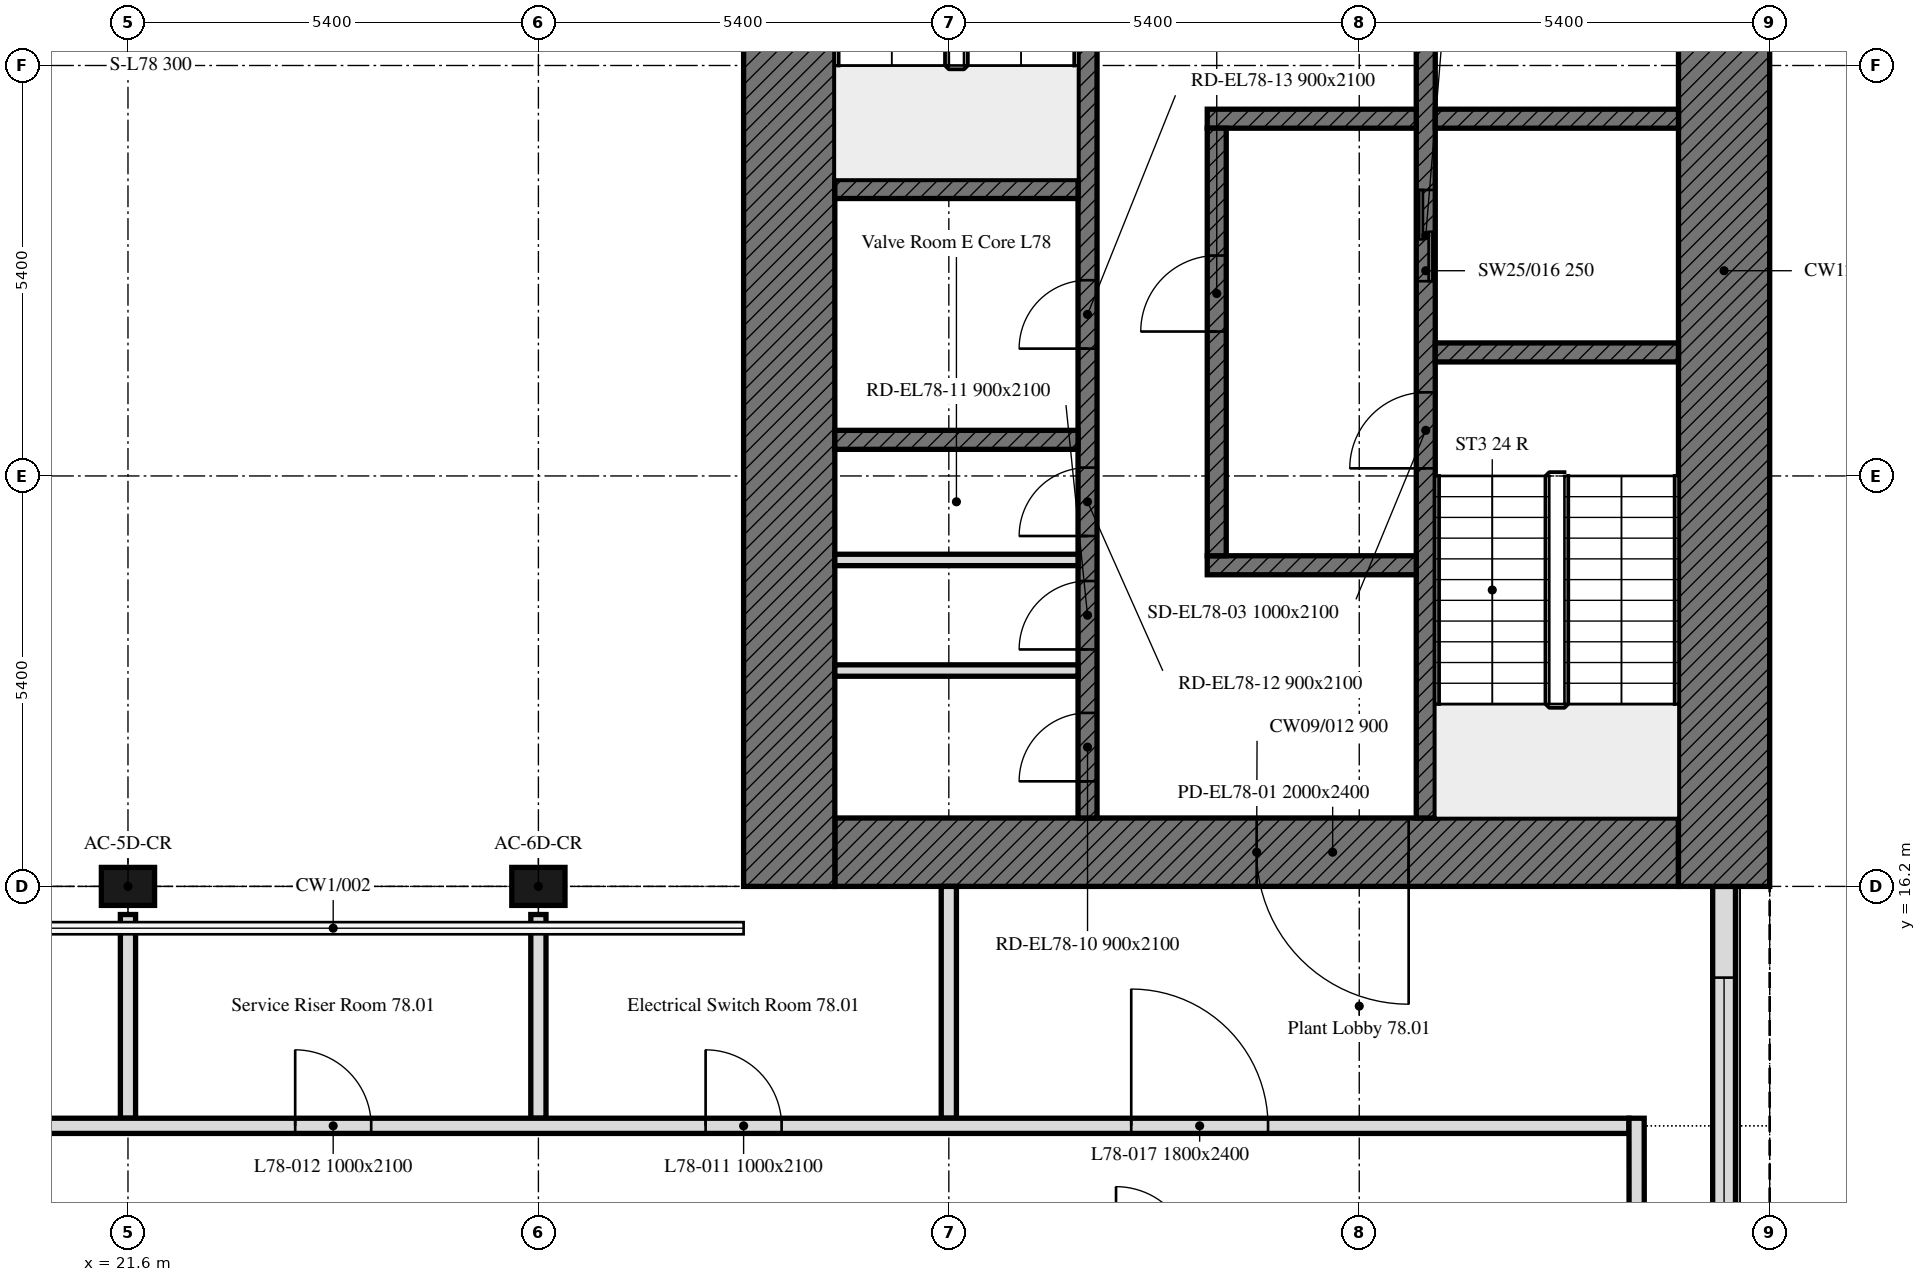
"""IFC4 building model, lengths in metres.
Left out: names, types, materials, properties, quantities, classifications, styles, units other than length and angle.
Written with IfcOpenShell. Run it as: python <this file> out.ifc"""

import sys

from ifc_helpers import new_model, si_unit, direction, frame, frame_2d, origin, origin_2d, place, context, subcontext, project, spatial, polyline, rectangle, outline, extrude, element, fill, save


model = new_model("IFC4")
c1 = context("Model", 3, precision=1e-05, world=origin(), true_north=direction((0.0, 1.0)))
c2 = subcontext(c1, "Body", "Model", "MODEL_VIEW")
j1 = project(units=[si_unit("LENGTHUNIT", "METRE"), si_unit("PLANEANGLEUNIT", "RADIAN")], contexts=[c1])
p1 = place(None, origin())
s1 = spatial("IfcSite", under=j1, at=p1, CompositionType="ELEMENT")
p2 = place(p1, origin())
s2 = spatial("IfcBuilding", under=s1, at=p2, CompositionType="ELEMENT")
p3 = place(p2, frame((0.0, 0.0, 312.7)))
s3 = spatial("IfcBuildingStorey", under=s2, at=p3, CompositionType="ELEMENT", Elevation=312.7)
for number, where, z_axis, x_axis in (
    (1, (21.6, 16.2, 0.0), (0.0, 0.0, 1.0), (1.0, 0.0, 0.0)),
    (2, (27.0, 16.2, 0.0), (0.0, 0.0, 1.0), (1.0, 0.0, 0.0)),
):
    element("IfcColumn", number, at=place(p3, frame(where, z_axis=z_axis, x_axis=x_axis)), inside=s3, PredefinedType="COLUMN", context=c2, shape_type="SweptSolid", body=[
        extrude(rectangle(XDim=0.7, YDim=0.5, at=origin_2d()), origin(), (0.0, 0.0, 1.0), 4.2),
    ])
p4 = place(p3, frame((42.6, 10.986, 0.0), z_axis=(0.0, 0.0, 1.0), x_axis=(0.0, 1.0, 0.0)))
e3 = element("IfcWall", 3, at=p4, inside=s3, PredefinedType="SOLIDWALL", context=c2, shape_type="SweptSolid", body=[
    extrude(outline(polyline([(0.0, 0.0), (5.214, 0.0), (5.214, 4.2), (4.634, 4.2), (4.055, 4.2), (3.476, 4.2), (2.896, 4.2), (2.317, 4.2), (1.738, 4.2), (1.159, 4.2), (0.579, 4.2), (0.0, 4.2), (0.0, 0.0)])), frame((0.0, 0.15, 0.0), z_axis=(0.0, -1.0, 0.0), x_axis=(1.0, 0.0, 0.0)), (0.0, 0.0, 1.0), 0.3),
])
p5 = place(p4, frame((1.014, 0.0, 0.6)))
e4 = element("IfcOpeningElement", 4, at=p5, cuts=e3, PredefinedType="OPENING", context=c2, shape_type="SweptSolid", body=[
    extrude(rectangle(XDim=3.0, YDim=1.8, at=frame_2d((1.5, 0.9))), frame((0.0, 0.16, 0.0), z_axis=(0.0, -1.0, 0.0), x_axis=(1.0, 0.0, 0.0)), (0.0, 0.0, 1.0), 0.32),
])
p6 = place(p3, frame((42.0, 16.65, 0.0), z_axis=(0.0, 0.0, 1.0), x_axis=(-1.0, 0.0, 0.0)))
e5 = element("IfcWall", 5, at=p6, inside=s3, PredefinedType="SOLIDWALL", context=c2, shape_type="SweptSolid", body=[
    extrude(rectangle(XDim=11.1, YDim=0.9, at=frame_2d((5.55, 0.0))), origin(), (0.0, 0.0, 1.0), 4.2),
])
p7 = place(p6, frame((3.55, 0.0, 0.0)))
e6 = element("IfcOpeningElement", 6, at=p7, cuts=e5, PredefinedType="OPENING", context=c2, shape_type="SweptSolid", body=[
    extrude(rectangle(XDim=2.0, YDim=2.4, at=frame_2d((1.0, 1.2))), frame((0.0, 0.45, 0.0), z_axis=(0.0, -1.0, 0.0), x_axis=(1.0, 0.0, 0.0)), (0.0, 0.0, 1.0), 0.9),
])
for number, where, z_axis, x_axis in (
    (7, (42.6, 32.4, 0.0), (0.0, 0.0, 1.0), (0.0, -1.0, 0.0)),
    (8, (30.3, 16.2, 0.0), (0.0, 0.0, 1.0), (0.0, 1.0, 0.0)),
):
    element("IfcWall", number, at=place(p3, frame(where, z_axis=z_axis, x_axis=x_axis)), inside=s3, PredefinedType="SOLIDWALL", context=c2, shape_type="SweptSolid", body=[
        extrude(rectangle(XDim=16.2, YDim=1.2, at=frame_2d((8.1, 0.0))), origin(), (0.0, 0.0, 1.0), 4.2),
    ])
p8 = place(p3, frame((38.675, 17.1, 0.0), z_axis=(0.0, 0.0, 1.0), x_axis=(0.0, 1.0, 0.0)))
e9 = element("IfcWall", 9, at=p8, inside=s3, PredefinedType="SOLIDWALL", context=c2, shape_type="SweptSolid", body=[
    extrude(rectangle(XDim=14.4, YDim=0.25, at=frame_2d((7.2, 0.0))), origin(), (0.0, 0.0, 1.0), 4.2),
])
p9 = place(p8, frame((4.6, 0.0, 0.0)))
e10 = element("IfcOpeningElement", 10, at=p9, cuts=e9, PredefinedType="OPENING", context=c2, shape_type="SweptSolid", body=[
    extrude(rectangle(XDim=1.0, YDim=2.1, at=frame_2d((0.5, 1.05))), frame((0.0, 0.125, 0.0), z_axis=(0.0, -1.0, 0.0), x_axis=(1.0, 0.0, 0.0)), (0.0, 0.0, 1.0), 0.25),
])
p10 = place(p8, frame((7.062, 0.0, 0.0)))
e11 = element("IfcOpeningElement", 11, at=p10, cuts=e9, PredefinedType="OPENING", context=c2, shape_type="SweptSolid", body=[
    extrude(rectangle(XDim=1.2, YDim=2.1, at=frame_2d((0.6, 1.05))), frame((0.0, 0.125, 0.0), z_axis=(0.0, -1.0, 0.0), x_axis=(1.0, 0.0, 0.0)), (0.0, 0.0, 1.0), 0.25),
])
p11 = place(p8, frame((10.41, 0.0, 0.0)))
e12 = element("IfcOpeningElement", 12, at=p11, cuts=e9, PredefinedType="OPENING", context=c2, shape_type="SweptSolid", body=[
    extrude(rectangle(XDim=0.9, YDim=2.1, at=frame_2d((0.45, 1.05))), frame((0.0, 0.125, 0.0), z_axis=(0.0, -1.0, 0.0), x_axis=(1.0, 0.0, 0.0)), (0.0, 0.0, 1.0), 0.25),
])
p12 = place(p8, frame((13.023, 0.0, 0.0)))
e13 = element("IfcOpeningElement", 13, at=p12, cuts=e9, PredefinedType="OPENING", context=c2, shape_type="SweptSolid", body=[
    extrude(rectangle(XDim=0.9, YDim=2.1, at=frame_2d((0.45, 1.05))), frame((0.0, 0.125, 0.0), z_axis=(0.0, -1.0, 0.0), x_axis=(1.0, 0.0, 0.0)), (0.0, 0.0, 1.0), 0.25),
])
p13 = place(p3, frame((34.225, 17.1, 0.0), z_axis=(0.0, 0.0, 1.0), x_axis=(0.0, 1.0, 0.0)))
e14 = element("IfcWall", 14, at=p13, inside=s3, PredefinedType="SOLIDWALL", context=c2, shape_type="SweptSolid", body=[
    extrude(rectangle(XDim=14.4, YDim=0.25, at=frame_2d((7.2, 0.0))), origin(), (0.0, 0.0, 1.0), 4.2),
])
p14 = place(p13, frame((13.15, 0.0, 0.0)))
e15 = element("IfcOpeningElement", 15, at=p14, cuts=e14, PredefinedType="OPENING", context=c2, shape_type="SweptSolid", body=[
    extrude(rectangle(XDim=1.0, YDim=2.1, at=frame_2d((0.5, 1.05))), frame((0.0, 0.125, 0.0), z_axis=(0.0, -1.0, 0.0), x_axis=(1.0, 0.0, 0.0)), (0.0, 0.0, 1.0), 0.25),
])
p15 = place(p13, frame((0.482, 0.0, 0.0)))
e16 = element("IfcOpeningElement", 16, at=p15, cuts=e14, PredefinedType="OPENING", context=c2, shape_type="SweptSolid", body=[
    extrude(rectangle(XDim=0.9, YDim=2.1, at=frame_2d((0.45, 1.05))), frame((0.0, 0.125, 0.0), z_axis=(0.0, -1.0, 0.0), x_axis=(1.0, 0.0, 0.0)), (0.0, 0.0, 1.0), 0.25),
])
p16 = place(p13, frame((2.218, 0.0, 0.0)))
e17 = element("IfcOpeningElement", 17, at=p16, cuts=e14, PredefinedType="OPENING", context=c2, shape_type="SweptSolid", body=[
    extrude(rectangle(XDim=0.9, YDim=2.1, at=frame_2d((0.45, 1.05))), frame((0.0, 0.125, 0.0), z_axis=(0.0, -1.0, 0.0), x_axis=(1.0, 0.0, 0.0)), (0.0, 0.0, 1.0), 0.25),
])
p17 = place(p13, frame((3.71, 0.0, 0.0)))
e18 = element("IfcOpeningElement", 18, at=p17, cuts=e14, PredefinedType="OPENING", context=c2, shape_type="SweptSolid", body=[
    extrude(rectangle(XDim=0.9, YDim=2.1, at=frame_2d((0.45, 1.05))), frame((0.0, 0.125, 0.0), z_axis=(0.0, -1.0, 0.0), x_axis=(1.0, 0.0, 0.0)), (0.0, 0.0, 1.0), 0.25),
])
p18 = place(p13, frame((6.175, 0.0, 0.0)))
e19 = element("IfcOpeningElement", 19, at=p18, cuts=e14, PredefinedType="OPENING", context=c2, shape_type="SweptSolid", body=[
    extrude(rectangle(XDim=0.9, YDim=2.1, at=frame_2d((0.45, 1.05))), frame((0.0, 0.125, 0.0), z_axis=(0.0, -1.0, 0.0), x_axis=(1.0, 0.0, 0.0)), (0.0, 0.0, 1.0), 0.25),
])
p19 = place(p3, frame((38.8, 23.225, 0.0), z_axis=(0.0, 0.0, 1.0), x_axis=(1.0, 0.0, 0.0)))
e20 = element("IfcWall", 20, at=p19, inside=s3, PredefinedType="SOLIDWALL", context=c2, shape_type="SweptSolid", body=[
    extrude(rectangle(XDim=3.2, YDim=0.25, at=frame_2d((1.6, 0.0))), origin(), (0.0, 0.0, 1.0), 4.2),
])
for number, where, z_axis, x_axis in (
    (21, (30.9, 25.375, 0.0), (0.0, 0.0, 1.0), (1.0, 0.0, 0.0)),
    (22, (30.9, 22.075, 0.0), (0.0, 0.0, 1.0), (1.0, 0.0, 0.0)),
):
    element("IfcWall", number, at=place(p3, frame(where, z_axis=z_axis, x_axis=x_axis)), inside=s3, PredefinedType="SOLIDWALL", context=c2, shape_type="SweptSolid", body=[
        extrude(rectangle(XDim=3.2, YDim=0.25, at=frame_2d((1.6, 0.0))), origin(), (0.0, 0.0, 1.0), 4.2),
    ])
p20 = place(p3, frame((38.8, 26.3, 0.0), z_axis=(0.0, 0.0, 1.0), x_axis=(1.0, 0.0, 0.0)))
e23 = element("IfcWall", 23, at=p20, inside=s3, PredefinedType="SOLIDWALL", context=c2, shape_type="SweptSolid", body=[
    extrude(rectangle(XDim=3.2, YDim=0.25, at=frame_2d((1.6, 0.0))), origin(), (0.0, 0.0, 1.0), 4.2),
])
for number, where, z_axis, x_axis in (
    (24, (35.8, 26.3, 0.0), (0.0, 0.0, 1.0), (1.0, 0.0, 0.0)),
    (25, (35.8, 20.425, 0.0), (0.0, 0.0, 1.0), (1.0, 0.0, 0.0)),
):
    element("IfcWall", number, at=place(p3, frame(where, z_axis=z_axis, x_axis=x_axis)), inside=s3, PredefinedType="SOLIDWALL", context=c2, shape_type="SweptSolid", body=[
        extrude(rectangle(XDim=2.75, YDim=0.25, at=frame_2d((1.375, 0.0))), origin(), (0.0, 0.0, 1.0), 4.2),
    ])
p21 = place(p3, frame((35.925, 20.55, 0.0), z_axis=(0.0, 0.0, 1.0), x_axis=(0.0, 1.0, 0.0)))
e26 = element("IfcWall", 26, at=p21, inside=s3, PredefinedType="SOLIDWALL", context=c2, shape_type="SweptSolid", body=[
    extrude(rectangle(XDim=5.625, YDim=0.25, at=frame_2d((2.812, 0.0))), origin(), (0.0, 0.0, 1.0), 4.2),
])
p22 = place(p21, frame((2.95, 0.0, 0.0)))
e27 = element("IfcOpeningElement", 27, at=p22, cuts=e26, PredefinedType="OPENING", context=c2, shape_type="SweptSolid", body=[
    extrude(rectangle(XDim=1.0, YDim=2.1, at=frame_2d((0.5, 1.05))), frame((0.0, 0.125, 0.0), z_axis=(0.0, -1.0, 0.0), x_axis=(1.0, 0.0, 0.0)), (0.0, 0.0, 1.0), 0.25),
])
for number, where, z_axis, x_axis in (
    (28, (30.9, 19.04, 0.0), (0.0, 0.0, 1.0), (1.0, 0.0, 0.0)),
    (29, (30.9, 20.495, 0.0), (0.0, 0.0, 1.0), (1.0, 0.0, 0.0)),
):
    element("IfcWall", number, at=place(p3, frame(where, z_axis=z_axis, x_axis=x_axis)), inside=s3, PredefinedType="PARTITIONING", context=c2, shape_type="SweptSolid", body=[
        extrude(rectangle(XDim=3.2, YDim=0.15, at=frame_2d((1.6, 0.0))), origin(), (0.0, 0.0, 1.0), 4.2),
    ])
p23 = place(p3, frame((27.0, 15.83, 0.0), z_axis=(0.0, 0.0, 1.0), x_axis=(0.0, -1.0, 0.0)))
e30 = element("IfcWall", 30, at=p23, inside=s3, PredefinedType="PARTITIONING", context=c2, shape_type="SweptSolid", body=[
    extrude(rectangle(XDim=2.68, YDim=0.2, at=frame_2d((1.34, 0.0))), origin(), (0.0, 0.0, 1.0), 4.2),
])
p24 = place(p3, frame((32.4, 13.15, 0.0), z_axis=(0.0, 0.0, 1.0), x_axis=(0.0, 1.0, 0.0)))
e31 = element("IfcWall", 31, at=p24, inside=s3, PredefinedType="PARTITIONING", context=c2, shape_type="SweptSolid", body=[
    extrude(rectangle(XDim=3.05, YDim=0.2, at=frame_2d((1.525, 0.0))), origin(), (0.0, 0.0, 1.0), 4.2),
])
p25 = place(p3, frame((21.6, 15.83, 0.0), z_axis=(0.0, 0.0, 1.0), x_axis=(0.0, -1.0, 0.0)))
e32 = element("IfcWall", 32, at=p25, inside=s3, PredefinedType="PARTITIONING", context=c2, shape_type="SweptSolid", body=[
    extrude(rectangle(XDim=2.68, YDim=0.2, at=frame_2d((1.34, 0.0))), origin(), (0.0, 0.0, 1.0), 4.2),
])
p26 = place(p3, frame((5.3, 13.05, 0.0), z_axis=(0.0, 0.0, 1.0), x_axis=(1.0, 0.0, 0.0)))
e33 = element("IfcWall", 33, at=p26, inside=s3, PredefinedType="PARTITIONING", context=c2, shape_type="SweptSolid", body=[
    extrude(rectangle(XDim=36.049, YDim=0.2, at=frame_2d((18.024, 0.0))), origin(), (0.0, 0.0, 1.0), 4.2),
])
p27 = place(p26, frame((23.9, 0.0, 0.0)))
e34 = element("IfcOpeningElement", 34, at=p27, cuts=e33, PredefinedType="OPENING", context=c2, shape_type="SweptSolid", body=[
    extrude(rectangle(XDim=1.0, YDim=2.1, at=frame_2d((0.5, 1.05))), frame((0.0, 0.1, 0.0), z_axis=(0.0, -1.0, 0.0), x_axis=(1.0, 0.0, 0.0)), (0.0, 0.0, 1.0), 0.2),
])
p28 = place(p26, frame((18.5, 0.0, 0.0)))
e35 = element("IfcOpeningElement", 35, at=p28, cuts=e33, PredefinedType="OPENING", context=c2, shape_type="SweptSolid", body=[
    extrude(rectangle(XDim=1.0, YDim=2.1, at=frame_2d((0.5, 1.05))), frame((0.0, 0.1, 0.0), z_axis=(0.0, -1.0, 0.0), x_axis=(1.0, 0.0, 0.0)), (0.0, 0.0, 1.0), 0.2),
])
p29 = place(p26, frame((13.2, 0.0, 0.0)))
e36 = element("IfcOpeningElement", 36, at=p29, cuts=e33, PredefinedType="OPENING", context=c2, shape_type="SweptSolid", body=[
    extrude(rectangle(XDim=0.8, YDim=2.1, at=frame_2d((0.4, 1.05))), frame((0.0, 0.1, 0.0), z_axis=(0.0, -1.0, 0.0), x_axis=(1.0, 0.0, 0.0)), (0.0, 0.0, 1.0), 0.2),
])
p30 = place(p26, frame((29.5, 0.0, 0.0)))
e37 = element("IfcOpeningElement", 37, at=p30, cuts=e33, PredefinedType="OPENING", context=c2, shape_type="SweptSolid", body=[
    extrude(rectangle(XDim=1.8, YDim=2.4, at=frame_2d((0.9, 1.2))), frame((0.0, 0.1, 0.0), z_axis=(0.0, -1.0, 0.0), x_axis=(1.0, 0.0, 0.0)), (0.0, 0.0, 1.0), 0.2),
])
p31 = place(p26, frame((2.5, 0.0, 0.0)))
e38 = element("IfcOpeningElement", 38, at=p31, cuts=e33, PredefinedType="OPENING", context=c2, shape_type="SweptSolid", body=[
    extrude(rectangle(XDim=1.8, YDim=2.4, at=frame_2d((0.9, 1.2))), frame((0.0, 0.1, 0.0), z_axis=(0.0, -1.0, 0.0), x_axis=(1.0, 0.0, 0.0)), (0.0, 0.0, 1.0), 0.2),
])
p32 = place(p3, frame((41.449, 13.15, 0.0), z_axis=(0.0, 0.0, 1.0), x_axis=(0.00085543168, -0.999999634118, 0.0)))
e39 = element("IfcWall", 39, at=p32, inside=s3, PredefinedType="PARTITIONING", context=c2, shape_type="SweptSolid", body=[
    extrude(rectangle(XDim=1.427, YDim=0.2, at=frame_2d((0.713, 0.0))), origin(), (0.0, 0.0, 1.0), 4.2),
])
p33 = place(p5, origin())
e40 = element("IfcWindow", 40, at=p33, inside=s3, PartitioningType="SINGLE_PANEL", PredefinedType="WINDOW", context=c2, shape_type="SweptSolid", body=[
    extrude(rectangle(XDim=3.0, YDim=1.8, at=frame_2d((1.5, 0.9))), frame((0.0, 0.03, 0.0), z_axis=(0.0, -1.0, 0.0), x_axis=(1.0, 0.0, 0.0)), (0.0, 0.0, 1.0), 0.06),
])
fill(e4, e40)
p34 = place(p7, origin())
e41 = element("IfcDoor", 41, at=p34, inside=s3, OperationType="DOUBLE_DOOR_SINGLE_SWING", PredefinedType="DOOR", context=c2, shape_type="SweptSolid", body=[
    extrude(rectangle(XDim=2.0, YDim=2.4, at=frame_2d((1.0, 1.2))), frame((0.0, 0.025, 0.0), z_axis=(0.0, -1.0, 0.0), x_axis=(1.0, 0.0, 0.0)), (0.0, 0.0, 1.0), 0.05),
])
fill(e6, e41)
p35 = place(p9, origin())
e42 = element("IfcDoor", 42, at=p35, inside=s3, OperationType="SINGLE_SWING_LEFT", PredefinedType="DOOR", context=c2, shape_type="SweptSolid", body=[
    extrude(rectangle(XDim=1.0, YDim=2.1, at=frame_2d((0.5, 1.05))), frame((0.0, 0.025, 0.0), z_axis=(0.0, -1.0, 0.0), x_axis=(1.0, 0.0, 0.0)), (0.0, 0.0, 1.0), 0.05),
])
fill(e10, e42)
p36 = place(p22, origin())
e43 = element("IfcDoor", 43, at=p36, inside=s3, OperationType="SINGLE_SWING_LEFT", PredefinedType="DOOR", context=c2, shape_type="SweptSolid", body=[
    extrude(rectangle(XDim=1.0, YDim=2.1, at=frame_2d((0.5, 1.05))), frame((0.0, 0.025, 0.0), z_axis=(0.0, -1.0, 0.0), x_axis=(1.0, 0.0, 0.0)), (0.0, 0.0, 1.0), 0.05),
])
fill(e27, e43)
p37 = place(p10, origin())
e44 = element("IfcDoor", 44, at=p37, inside=s3, OperationType="DOUBLE_DOOR_SLIDING", PredefinedType="DOOR", context=c2, shape_type="SweptSolid", body=[
    extrude(rectangle(XDim=1.2, YDim=2.1, at=frame_2d((0.6, 1.05))), frame((0.0, 0.025, 0.0), z_axis=(0.0, -1.0, 0.0), x_axis=(1.0, 0.0, 0.0)), (0.0, 0.0, 1.0), 0.05),
])
fill(e11, e44)
p38 = place(p15, origin())
e45 = element("IfcDoor", 45, at=p38, inside=s3, OperationType="SINGLE_SWING_LEFT", PredefinedType="DOOR", context=c2, shape_type="SweptSolid", body=[
    extrude(rectangle(XDim=0.9, YDim=2.1, at=frame_2d((0.45, 1.05))), frame((0.0, 0.025, 0.0), z_axis=(0.0, -1.0, 0.0), x_axis=(1.0, 0.0, 0.0)), (0.0, 0.0, 1.0), 0.05),
])
fill(e16, e45)
p39 = place(p16, origin())
e46 = element("IfcDoor", 46, at=p39, inside=s3, OperationType="SINGLE_SWING_LEFT", PredefinedType="DOOR", context=c2, shape_type="SweptSolid", body=[
    extrude(rectangle(XDim=0.9, YDim=2.1, at=frame_2d((0.45, 1.05))), frame((0.0, 0.025, 0.0), z_axis=(0.0, -1.0, 0.0), x_axis=(1.0, 0.0, 0.0)), (0.0, 0.0, 1.0), 0.05),
])
fill(e17, e46)
p40 = place(p17, origin())
e47 = element("IfcDoor", 47, at=p40, inside=s3, OperationType="SINGLE_SWING_LEFT", PredefinedType="DOOR", context=c2, shape_type="SweptSolid", body=[
    extrude(rectangle(XDim=0.9, YDim=2.1, at=frame_2d((0.45, 1.05))), frame((0.0, 0.025, 0.0), z_axis=(0.0, -1.0, 0.0), x_axis=(1.0, 0.0, 0.0)), (0.0, 0.0, 1.0), 0.05),
])
fill(e18, e47)
p41 = place(p18, origin())
e48 = element("IfcDoor", 48, at=p41, inside=s3, OperationType="SINGLE_SWING_LEFT", PredefinedType="DOOR", context=c2, shape_type="SweptSolid", body=[
    extrude(rectangle(XDim=0.9, YDim=2.1, at=frame_2d((0.45, 1.05))), frame((0.0, 0.025, 0.0), z_axis=(0.0, -1.0, 0.0), x_axis=(1.0, 0.0, 0.0)), (0.0, 0.0, 1.0), 0.05),
])
fill(e19, e48)
p42 = place(p27, origin())
e49 = element("IfcDoor", 49, at=p42, inside=s3, OperationType="SINGLE_SWING_LEFT", PredefinedType="DOOR", context=c2, shape_type="SweptSolid", body=[
    extrude(rectangle(XDim=1.0, YDim=2.1, at=frame_2d((0.5, 1.05))), frame((0.0, 0.025, 0.0), z_axis=(0.0, -1.0, 0.0), x_axis=(1.0, 0.0, 0.0)), (0.0, 0.0, 1.0), 0.05),
])
fill(e34, e49)
p43 = place(p28, origin())
e50 = element("IfcDoor", 50, at=p43, inside=s3, OperationType="SINGLE_SWING_RIGHT", PredefinedType="DOOR", context=c2, shape_type="SweptSolid", body=[
    extrude(rectangle(XDim=1.0, YDim=2.1, at=frame_2d((0.5, 1.05))), frame((0.0, 0.025, 0.0), z_axis=(0.0, -1.0, 0.0), x_axis=(1.0, 0.0, 0.0)), (0.0, 0.0, 1.0), 0.05),
])
fill(e35, e50)
p44 = place(p30, origin())
e51 = element("IfcDoor", 51, at=p44, inside=s3, OperationType="DOUBLE_DOOR_SINGLE_SWING", PredefinedType="DOOR", context=c2, shape_type="SweptSolid", body=[
    extrude(rectangle(XDim=1.8, YDim=2.4, at=frame_2d((0.9, 1.2))), frame((0.0, 0.025, 0.0), z_axis=(0.0, -1.0, 0.0), x_axis=(1.0, 0.0, 0.0)), (0.0, 0.0, 1.0), 0.05),
])
fill(e37, e51)
save(model, sys.argv[1])
